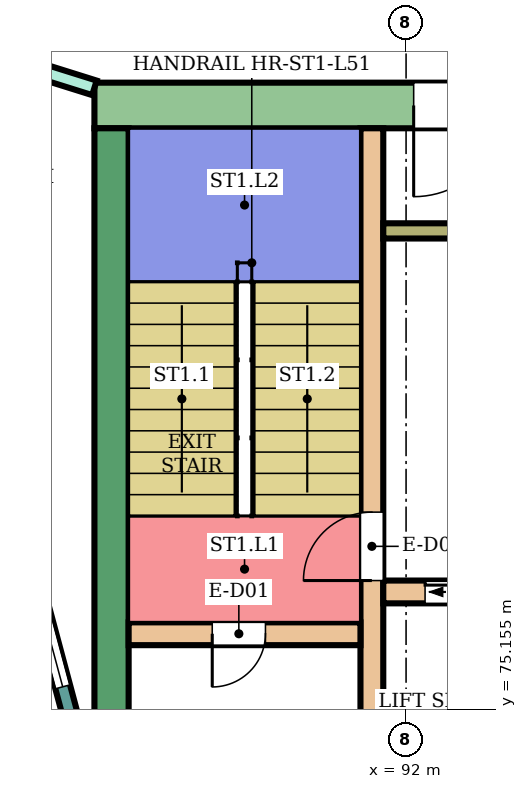
"""IFC4 building model, lengths in metres.
Left out: names, types, materials, properties, quantities, classifications, styles, units other than length and angle.
Written with IfcOpenShell. Run it as: python <this file> out.ifc"""

import sys

from ifc_helpers import new_model, si_unit, direction, frame, frame_2d, origin, place, context, subcontext, project, spatial, rectangle, extrude, element, fill, save


model = new_model("IFC4")
c1 = context("Model", 3, precision=1e-05, world=origin(), true_north=direction((0.0, 1.0)))
c2 = subcontext(c1, "Body", "Model", "MODEL_VIEW")
j1 = project(units=[si_unit("LENGTHUNIT", "METRE"), si_unit("PLANEANGLEUNIT", "RADIAN")], contexts=[c1])
p1 = place(None, origin())
s1 = spatial("IfcSite", under=j1, at=p1, CompositionType="ELEMENT")
p2 = place(p1, origin())
s2 = spatial("IfcBuilding", under=s1, at=p2, CompositionType="ELEMENT")
p3 = place(p2, frame((0.0, 0.0, 220.9)))
s3 = spatial("IfcBuildingStorey", under=s2, at=p3, CompositionType="ELEMENT", Elevation=220.9)
p4 = place(p3, frame((87.9, 83.1, 0.0), z_axis=(0.0, 0.0, 1.0), x_axis=(1.0, 0.0, 0.0)))
e1 = element("IfcWall", 1, at=p4, inside=s3, PredefinedType="SHEAR", context=c2, shape_type="SweptSolid", body=[
    extrude(rectangle(XDim=14.9, YDim=0.6, at=frame_2d((7.45, 0.0))), origin(), (0.0, 0.0, 1.0), 3.88),
])
p5 = place(p4, frame((4.2, 0.0, 0.0)))
e2 = element("IfcOpeningElement", 2, at=p5, cuts=e1, PredefinedType="OPENING", context=c2, shape_type="SweptSolid", body=[
    extrude(rectangle(XDim=2.4, YDim=2.4, at=frame_2d((1.2, 1.2))), frame((0.0, 0.31, 0.0), z_axis=(0.0, -1.0, 0.0), x_axis=(1.0, 0.0, 0.0)), (0.0, 0.0, 1.0), 0.62),
])
p6 = place(p3, frame((88.125, 75.0, 0.0), z_axis=(0.0, 0.0, 1.0), x_axis=(0.0, 1.0, 0.0)))
e3 = element("IfcWall", 3, at=p6, inside=s3, PredefinedType="SHEAR", context=c2, shape_type="SweptSolid", body=[
    extrude(rectangle(XDim=7.8, YDim=0.45, at=frame_2d((3.9, 0.0))), origin(), (0.0, 0.0, 1.0), 3.88),
])
p7 = place(p3, frame((91.55, 75.0, 0.0), z_axis=(0.0, 0.0, 1.0), x_axis=(0.0, 1.0, 0.0)))
e4 = element("IfcWall", 4, at=p7, inside=s3, PredefinedType="SHEAR", context=c2, shape_type="SweptSolid", body=[
    extrude(rectangle(XDim=7.8, YDim=0.3, at=frame_2d((3.9, 0.0))), origin(), (0.0, 0.0, 1.0), 3.88),
])
p8 = place(p7, frame((1.85, 0.0, 0.0)))
e5 = element("IfcOpeningElement", 5, at=p8, cuts=e4, PredefinedType="OPENING", context=c2, shape_type="SweptSolid", body=[
    extrude(rectangle(XDim=0.9, YDim=2.1, at=frame_2d((0.45, 1.05))), frame((0.0, 0.16, 0.0), z_axis=(0.0, -1.0, 0.0), x_axis=(1.0, 0.0, 0.0)), (0.0, 0.0, 1.0), 0.32),
])
p9 = place(p3, frame((88.35, 76.15, 0.0), z_axis=(0.0, 0.0, 1.0), x_axis=(1.0, 0.0, 0.0)))
e6 = element("IfcWall", 6, at=p9, inside=s3, PredefinedType="SHEAR", context=c2, shape_type="SweptSolid", body=[
    extrude(rectangle(XDim=3.05, YDim=0.3, at=frame_2d((1.525, 0.0))), origin(), (0.0, 0.0, 1.0), 3.88),
])
p10 = place(p9, frame((1.1, 0.0, 0.0)))
e7 = element("IfcOpeningElement", 7, at=p10, cuts=e6, PredefinedType="OPENING", context=c2, shape_type="SweptSolid", body=[
    extrude(rectangle(XDim=0.7, YDim=2.0, at=frame_2d((0.35, 1.0))), frame((0.0, 0.16, 0.0), z_axis=(0.0, -1.0, 0.0), x_axis=(1.0, 0.0, 0.0)), (0.0, 0.0, 1.0), 0.32),
])
p11 = place(p3, frame((91.7, 76.7, 0.0), z_axis=(0.0, 0.0, 1.0), x_axis=(1.0, 0.0, 0.0)))
e8 = element("IfcWall", 8, at=p11, inside=s3, PredefinedType="SHEAR", context=c2, shape_type="SweptSolid", body=[
    extrude(rectangle(XDim=11.1, YDim=0.3, at=frame_2d((5.55, 0.0))), origin(), (0.0, 0.0, 1.0), 3.88),
])
p12 = place(p11, frame((0.55, 0.0, 0.0)))
e9 = element("IfcOpeningElement", 9, at=p12, cuts=e8, PredefinedType="OPENING", context=c2, shape_type="SweptSolid", body=[
    extrude(rectangle(XDim=1.1, YDim=2.1, at=frame_2d((0.55, 1.05))), frame((0.0, 0.16, 0.0), z_axis=(0.0, -1.0, 0.0), x_axis=(1.0, 0.0, 0.0)), (0.0, 0.0, 1.0), 0.32),
])
p13 = place(p11, frame((3.0, 0.0, 0.0)))
e10 = element("IfcOpeningElement", 10, at=p13, cuts=e8, PredefinedType="OPENING", context=c2, shape_type="SweptSolid", body=[
    extrude(rectangle(XDim=1.2, YDim=2.1, at=frame_2d((0.6, 1.05))), frame((0.0, 0.16, 0.0), z_axis=(0.0, -1.0, 0.0), x_axis=(1.0, 0.0, 0.0)), (0.0, 0.0, 1.0), 0.32),
])
p14 = place(p11, frame((5.5, 0.0, 0.0)))
e11 = element("IfcOpeningElement", 11, at=p14, cuts=e8, PredefinedType="OPENING", context=c2, shape_type="SweptSolid", body=[
    extrude(rectangle(XDim=1.2, YDim=2.1, at=frame_2d((0.6, 1.05))), frame((0.0, 0.16, 0.0), z_axis=(0.0, -1.0, 0.0), x_axis=(1.0, 0.0, 0.0)), (0.0, 0.0, 1.0), 0.32),
])
p15 = place(p11, frame((8.85, 0.0, 0.0)))
e12 = element("IfcOpeningElement", 12, at=p15, cuts=e8, PredefinedType="OPENING", context=c2, shape_type="SweptSolid", body=[
    extrude(rectangle(XDim=0.9, YDim=2.1, at=frame_2d((0.45, 1.05))), frame((0.0, 0.16, 0.0), z_axis=(0.0, -1.0, 0.0), x_axis=(1.0, 0.0, 0.0)), (0.0, 0.0, 1.0), 0.32),
])
p16 = place(p3, frame((91.7, 81.45, 0.0), z_axis=(0.0, 0.0, 1.0), x_axis=(1.0, 0.0, 0.0)))
e13 = element("IfcWall", 13, at=p16, inside=s3, PredefinedType="SHEAR", context=c2, shape_type="SweptSolid", body=[
    extrude(rectangle(XDim=4.35, YDim=0.2, at=frame_2d((2.175, 0.0))), origin(), (0.0, 0.0, 1.0), 3.88),
])
p17 = place(p3, frame((87.604, 75.0, 0.0), z_axis=(0.0, 0.0, 1.0), x_axis=(-0.258789828301, 0.965933654434, 0.0)))
e14 = element("IfcWall", 14, at=p17, inside=s3, PredefinedType="NOTDEFINED", context=c2, shape_type="SweptSolid", body=[
    extrude(rectangle(XDim=3.936, YDim=0.2, at=frame_2d((1.968, 0.0))), origin(), (0.0, 0.0, 1.0), 4.2),
])
p18 = place(p17, frame((0.468, 0.0, 0.9)))
e15 = element("IfcOpeningElement", 15, at=p18, cuts=e14, PredefinedType="OPENING", context=c2, shape_type="SweptSolid", body=[
    extrude(rectangle(XDim=3.0, YDim=2.3, at=frame_2d((1.5, 1.15))), frame((0.0, 0.11, 0.0), z_axis=(0.0, -1.0, 0.0), x_axis=(1.0, 0.0, 0.0)), (0.0, 0.0, 1.0), 0.22),
])
p19 = place(p3, frame((85.587, 84.057, 0.0), z_axis=(0.0, 0.0, 1.0), x_axis=(0.954239513179, -0.299043393987, 0.0)))
e16 = element("IfcWall", 16, at=p19, inside=s3, PredefinedType="PARTITIONING", context=c2, shape_type="SweptSolid", body=[
    extrude(rectangle(XDim=2.424, YDim=0.2, at=frame_2d((1.212, 0.0))), origin(), (0.0, 0.0, 1.0), 3.75),
])
p20 = place(p19, frame((0.762, 0.0, 0.0)))
e17 = element("IfcOpeningElement", 17, at=p20, cuts=e16, PredefinedType="OPENING", context=c2, shape_type="SweptSolid", body=[
    extrude(rectangle(XDim=0.9, YDim=2.1, at=frame_2d((0.45, 1.05))), frame((0.0, 0.11, 0.0), z_axis=(0.0, -1.0, 0.0), x_axis=(1.0, 0.0, 0.0)), (0.0, 0.0, 1.0), 0.22),
])
p21 = place(p18, origin())
e18 = element("IfcWindow", 18, at=p21, inside=s3, PartitioningType="SINGLE_PANEL", PredefinedType="WINDOW", context=c2, shape_type="SweptSolid", body=[
    extrude(rectangle(XDim=3.0, YDim=2.3, at=frame_2d((1.5, 1.15))), frame((0.0, 0.03, 0.0), z_axis=(0.0, -1.0, 0.0), x_axis=(1.0, 0.0, 0.0)), (0.0, 0.0, 1.0), 0.06),
])
fill(e15, e18)
p22 = place(p10, frame((0.7, 0.0, 0.0), z_axis=(0.0, 0.0, 1.0), x_axis=(-1.0, 0.0, 0.0)))
e19 = element("IfcDoor", 19, at=p22, inside=s3, OperationType="SINGLE_SWING_RIGHT", PredefinedType="DOOR", context=c2, shape_type="SweptSolid", body=[
    extrude(rectangle(XDim=0.7, YDim=2.0, at=frame_2d((0.35, 1.0))), frame((0.0, 0.025, 0.0), z_axis=(0.0, -1.0, 0.0), x_axis=(1.0, 0.0, 0.0)), (0.0, 0.0, 1.0), 0.05),
])
fill(e7, e19)
p23 = place(p8, origin())
e20 = element("IfcDoor", 20, at=p23, inside=s3, OperationType="SINGLE_SWING_LEFT", PredefinedType="DOOR", context=c2, shape_type="SweptSolid", body=[
    extrude(rectangle(XDim=0.9, YDim=2.1, at=frame_2d((0.45, 1.05))), frame((0.0, 0.025, 0.0), z_axis=(0.0, -1.0, 0.0), x_axis=(1.0, 0.0, 0.0)), (0.0, 0.0, 1.0), 0.05),
])
fill(e5, e20)
p24 = place(p12, origin())
e21 = element("IfcDoor", 21, at=p24, inside=s3, OperationType="DOUBLE_DOOR_SLIDING", PredefinedType="DOOR", context=c2, shape_type="SweptSolid", body=[
    extrude(rectangle(XDim=1.1, YDim=2.1, at=frame_2d((0.55, 1.05))), frame((0.0, 0.025, 0.0), z_axis=(0.0, -1.0, 0.0), x_axis=(1.0, 0.0, 0.0)), (0.0, 0.0, 1.0), 0.05),
])
fill(e9, e21)
p25 = place(p5, frame((2.4, 0.0, 0.0), z_axis=(0.0, 0.0, 1.0), x_axis=(-1.0, 0.0, 0.0)))
e22 = element("IfcDoor", 22, at=p25, inside=s3, OperationType="DOUBLE_DOOR_SINGLE_SWING", PredefinedType="DOOR", context=c2, shape_type="SweptSolid", body=[
    extrude(rectangle(XDim=2.4, YDim=2.4, at=frame_2d((1.2, 1.2))), frame((0.0, 0.025, 0.0), z_axis=(0.0, -1.0, 0.0), x_axis=(1.0, 0.0, 0.0)), (0.0, 0.0, 1.0), 0.05),
])
fill(e2, e22)
save(model, sys.argv[1])
